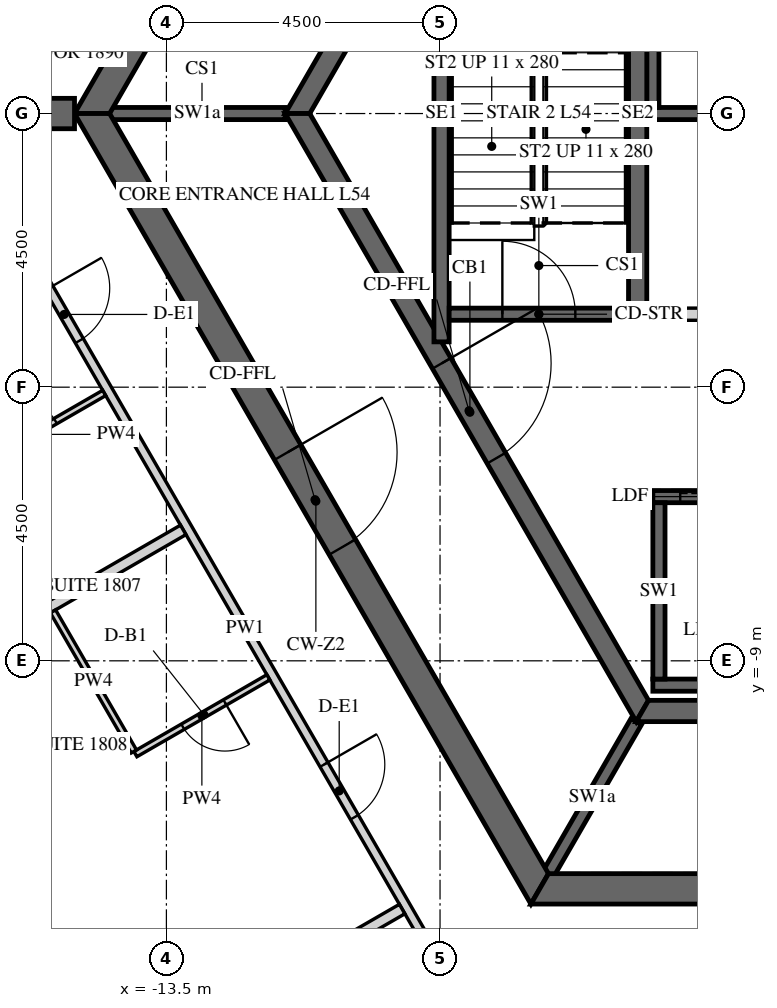
"""IFC4 building model, lengths in metres.
Left out: names, types, materials, properties, quantities, classifications, styles, units other than length and angle.
Written with IfcOpenShell. Run it as: python <this file> out.ifc"""

import sys

from ifc_helpers import new_model, si_unit, direction, frame, frame_2d, origin, place, context, subcontext, project, spatial, polyline, rectangle, outline, extrude, element, fill, save


model = new_model("IFC4")
c1 = context("Model", 3, precision=1e-05, world=origin(), true_north=direction((0.0, 1.0)))
c2 = subcontext(c1, "Body", "Model", "MODEL_VIEW")
j1 = project(units=[si_unit("LENGTHUNIT", "METRE"), si_unit("PLANEANGLEUNIT", "RADIAN")], contexts=[c1])
p1 = place(None, origin())
s1 = spatial("IfcSite", under=j1, at=p1, CompositionType="ELEMENT")
p2 = place(p1, origin())
s2 = spatial("IfcBuilding", under=s1, at=p2, CompositionType="ELEMENT")
p3 = place(p2, frame((0.0, 0.0, 226.8)))
s3 = spatial("IfcBuildingStorey", under=s2, at=p3, CompositionType="ELEMENT", Elevation=226.8)
p4 = place(p3, frame((-7.361, 12.75, -0.15), z_axis=(0.0, 0.0, 1.0), x_axis=(-0.50000571537, -0.866022103989, 0.0)))
e1 = element("IfcWall", 1, at=p4, inside=s3, PredefinedType="SHEAR", context=c2, shape_type="SweptSolid", body=[
    extrude(outline(polyline([(-0.144, -0.25), (14.867, -0.25), (14.578, 0.25), (0.144, 0.25), (-0.144, -0.25)])), origin(), (0.0, 0.0, 1.0), 3.9),
])
p5 = place(p4, frame((6.49, 0.0, 0.15)))
e2 = element("IfcOpeningElement", 2, at=p5, cuts=e1, PredefinedType="OPENING", context=c2, shape_type="SweptSolid", body=[
    extrude(rectangle(XDim=1.8, YDim=2.4, at=frame_2d((0.9, 1.2))), frame((0.0, 0.26, 0.0), z_axis=(0.0, -1.0, 0.0), x_axis=(1.0, 0.0, 0.0)), (0.0, 0.0, 1.0), 0.52),
])
p6 = place(p3, frame((-14.722, 0.0, -0.15), z_axis=(0.0, 0.0, 1.0), x_axis=(0.50000571537, -0.866022103989, 0.0)))
e3 = element("IfcWall", 3, at=p6, inside=s3, PredefinedType="SHEAR", context=c2, shape_type="SweptSolid", body=[
    extrude(outline(polyline([(-0.144, -0.25), (14.867, -0.25), (14.578, 0.25), (0.144, 0.25), (-0.144, -0.25)])), origin(), (0.0, 0.0, 1.0), 3.9),
])
p7 = place(p6, frame((6.432, 0.0, 0.15)))
e4 = element("IfcOpeningElement", 4, at=p7, cuts=e3, PredefinedType="OPENING", context=c2, shape_type="SweptSolid", body=[
    extrude(rectangle(XDim=1.8, YDim=2.4, at=frame_2d((0.9, 1.2))), frame((0.0, 0.26, 0.0), z_axis=(0.0, -1.0, 0.0), x_axis=(1.0, 0.0, 0.0)), (0.0, 0.0, 1.0), 0.52),
])
p8 = place(p3, frame((-7.361, -12.75, -0.15), z_axis=(0.0, 0.0, 1.0), x_axis=(1.0, 0.0, 0.0)))
e5 = element("IfcWall", 5, at=p8, inside=s3, PredefinedType="SHEAR", context=c2, shape_type="SweptSolid", body=[
    extrude(outline(polyline([(-0.144, -0.25), (14.866, -0.25), (14.578, 0.25), (0.144, 0.25), (-0.144, -0.25)])), origin(), (0.0, 0.0, 1.0), 3.9),
])
p9 = place(p8, frame((6.761, 0.0, 0.15)))
e6 = element("IfcOpeningElement", 6, at=p9, cuts=e5, PredefinedType="OPENING", context=c2, shape_type="SweptSolid", body=[
    extrude(rectangle(XDim=1.2, YDim=2.4, at=frame_2d((0.6, 1.2))), frame((0.0, 0.26, 0.0), z_axis=(0.0, -1.0, 0.0), x_axis=(1.0, 0.0, 0.0)), (0.0, 0.0, 1.0), 0.52),
])
p10 = place(p3, frame((-15.011, 0.0, -0.15), z_axis=(0.0, 0.0, 1.0), x_axis=(-1.0, 0.0, 0.0)))
e7 = element("IfcWall", 7, at=p10, inside=s3, PredefinedType="SHEAR", context=c2, shape_type="SweptSolid", body=[
    extrude(rectangle(XDim=15.424, YDim=0.5, at=frame_2d((7.712, 0.0))), origin(), (0.0, 0.0, 1.0), 3.9),
])
p11 = place(p10, frame((6.812, 0.0, 0.15)))
e8 = element("IfcOpeningElement", 8, at=p11, cuts=e7, PredefinedType="OPENING", context=c2, shape_type="SweptSolid", body=[
    extrude(rectangle(XDim=1.8, YDim=2.4, at=frame_2d((0.9, 1.2))), frame((0.0, 0.26, 0.0), z_axis=(0.0, -1.0, 0.0), x_axis=(1.0, 0.0, 0.0)), (0.0, 0.0, 1.0), 0.52),
])
p12 = place(p3, frame((-5.673, 9.825, -0.15), z_axis=(0.0, 0.0, 1.0), x_axis=(-0.499995046907, -0.866028263435, 0.0)))
e9 = element("IfcWall", 9, at=p12, inside=s3, PredefinedType="SHEAR", context=c2, shape_type="SweptSolid", body=[
    extrude(outline(polyline([(-0.101, -0.175), (11.446, -0.175), (11.244, 0.175), (0.101, 0.175), (-0.101, -0.175)])), origin(), (0.0, 0.0, 1.0), 3.9),
])
p13 = place(p12, frame((4.801, 0.0, 0.15)))
e10 = element("IfcOpeningElement", 10, at=p13, cuts=e9, PredefinedType="OPENING", context=c2, shape_type="SweptSolid", body=[
    extrude(rectangle(XDim=1.8, YDim=2.4, at=frame_2d((0.9, 1.2))), frame((0.0, 0.185, 0.0), z_axis=(0.0, -1.0, 0.0), x_axis=(1.0, 0.0, 0.0)), (0.0, 0.0, 1.0), 0.37),
])
p14 = place(p3, frame((-11.345, 0.0, -0.15), z_axis=(0.0, 0.0, 1.0), x_axis=(0.499995046907, -0.866028263435, 0.0)))
e11 = element("IfcWall", 11, at=p14, inside=s3, PredefinedType="SHEAR", context=c2, shape_type="SweptSolid", body=[
    extrude(outline(polyline([(-0.101, -0.175), (11.446, -0.175), (11.244, 0.175), (0.101, 0.175), (-0.101, -0.175)])), origin(), (0.0, 0.0, 1.0), 3.9),
])
p15 = place(p14, frame((4.744, 0.0, 0.15)))
e12 = element("IfcOpeningElement", 12, at=p15, cuts=e11, PredefinedType="OPENING", context=c2, shape_type="SweptSolid", body=[
    extrude(rectangle(XDim=1.8, YDim=2.4, at=frame_2d((0.9, 1.2))), frame((0.0, 0.185, 0.0), z_axis=(0.0, -1.0, 0.0), x_axis=(1.0, 0.0, 0.0)), (0.0, 0.0, 1.0), 0.37),
])
p16 = place(p3, frame((-5.673, -9.825, -0.15), z_axis=(0.0, 0.0, 1.0), x_axis=(1.0, 0.0, 0.0)))
e13 = element("IfcWall", 13, at=p16, inside=s3, PredefinedType="SHEAR", context=c2, shape_type="SweptSolid", body=[
    extrude(outline(polyline([(-0.101, -0.175), (11.446, -0.175), (11.244, 0.175), (0.101, 0.175), (-0.101, -0.175)])), origin(), (0.0, 0.0, 1.0), 3.9),
])
p17 = place(p3, frame((-5.6, 0.0, -0.25), z_axis=(0.0, 0.0, 1.0), x_axis=(1.0, 0.0, 0.0)))
e14 = element("IfcWall", 14, at=p17, inside=s3, PredefinedType="SHEAR", context=c2, shape_type="SweptSolid", body=[
    extrude(rectangle(XDim=11.2, YDim=0.2, at=frame_2d((5.6, 0.0))), origin(), (0.0, 0.0, 1.0), 3.9),
])
p18 = place(p3, frame((-5.5, 0.1, -0.25), z_axis=(0.0, 0.0, 1.0), x_axis=(0.0, 1.0, 0.0)))
e15 = element("IfcWall", 15, at=p18, inside=s3, PredefinedType="SHEAR", context=c2, shape_type="SweptSolid", body=[
    extrude(rectangle(XDim=3.1, YDim=0.2, at=frame_2d((1.55, 0.0))), origin(), (0.0, 0.0, 1.0), 3.9),
])
p19 = place(p3, frame((-5.5, -6.3, -0.25), z_axis=(0.0, 0.0, 1.0), x_axis=(1.0, 0.0, 0.0)))
e16 = element("IfcWall", 16, at=p19, inside=s3, PredefinedType="SHEAR", context=c2, shape_type="SweptSolid", body=[
    extrude(rectangle(XDim=9.2, YDim=0.2, at=frame_2d((4.6, 0.0))), origin(), (0.0, 0.0, 1.0), 3.9),
])
p20 = place(p19, frame((0.45, 0.0, 0.25)))
e17 = element("IfcOpeningElement", 17, at=p20, cuts=e16, PredefinedType="OPENING", context=c2, shape_type="SweptSolid", body=[
    extrude(rectangle(XDim=1.1, YDim=2.1, at=frame_2d((0.55, 1.05))), frame((0.0, 0.11, 0.0), z_axis=(0.0, -1.0, 0.0), x_axis=(1.0, 0.0, 0.0)), (0.0, 0.0, 1.0), 0.22),
])
p21 = place(p19, frame((2.25, 0.0, 0.25)))
e18 = element("IfcOpeningElement", 18, at=p21, cuts=e16, PredefinedType="OPENING", context=c2, shape_type="SweptSolid", body=[
    extrude(rectangle(XDim=1.1, YDim=2.1, at=frame_2d((0.55, 1.05))), frame((0.0, 0.11, 0.0), z_axis=(0.0, -1.0, 0.0), x_axis=(1.0, 0.0, 0.0)), (0.0, 0.0, 1.0), 0.22),
])
p22 = place(p19, frame((4.05, 0.0, 0.25)))
e19 = element("IfcOpeningElement", 19, at=p22, cuts=e16, PredefinedType="OPENING", context=c2, shape_type="SweptSolid", body=[
    extrude(rectangle(XDim=1.1, YDim=2.1, at=frame_2d((0.55, 1.05))), frame((0.0, 0.11, 0.0), z_axis=(0.0, -1.0, 0.0), x_axis=(1.0, 0.0, 0.0)), (0.0, 0.0, 1.0), 0.22),
])
p23 = place(p19, frame((5.85, 0.0, 0.25)))
e20 = element("IfcOpeningElement", 20, at=p23, cuts=e16, PredefinedType="OPENING", context=c2, shape_type="SweptSolid", body=[
    extrude(rectangle(XDim=1.1, YDim=2.1, at=frame_2d((0.55, 1.05))), frame((0.0, 0.11, 0.0), z_axis=(0.0, -1.0, 0.0), x_axis=(1.0, 0.0, 0.0)), (0.0, 0.0, 1.0), 0.22),
])
p24 = place(p19, frame((7.65, 0.0, 0.25)))
e21 = element("IfcOpeningElement", 21, at=p24, cuts=e16, PredefinedType="OPENING", context=c2, shape_type="SweptSolid", body=[
    extrude(rectangle(XDim=1.1, YDim=2.1, at=frame_2d((0.55, 1.05))), frame((0.0, 0.11, 0.0), z_axis=(0.0, -1.0, 0.0), x_axis=(1.0, 0.0, 0.0)), (0.0, 0.0, 1.0), 0.22),
])
p25 = place(p3, frame((-5.5, -9.4, -0.25), z_axis=(0.0, 0.0, 1.0), x_axis=(1.0, 0.0, 0.0)))
e22 = element("IfcWall", 22, at=p25, inside=s3, PredefinedType="SHEAR", context=c2, shape_type="SweptSolid", body=[
    extrude(rectangle(XDim=9.2, YDim=0.2, at=frame_2d((4.6, 0.0))), origin(), (0.0, 0.0, 1.0), 3.9),
])
p26 = place(p3, frame((-5.4, -9.3, -0.25), z_axis=(0.0, 0.0, 1.0), x_axis=(0.0, 1.0, 0.0)))
e23 = element("IfcWall", 23, at=p26, inside=s3, PredefinedType="SHEAR", context=c2, shape_type="SweptSolid", body=[
    extrude(rectangle(XDim=2.9, YDim=0.2, at=frame_2d((1.45, 0.0))), origin(), (0.0, 0.0, 1.0), 3.9),
])
p27 = place(p3, frame((-5.6, -3.3, 0.0), z_axis=(0.0, 0.0, 1.0), x_axis=(1.0, 0.0, 0.0)))
e24 = element("IfcWall", 24, at=p27, inside=s3, PredefinedType="PARTITIONING", context=c2, shape_type="SweptSolid", body=[
    extrude(rectangle(XDim=5.5, YDim=0.2, at=frame_2d((2.75, 0.0))), origin(), (0.0, 0.0, 1.0), 3.65),
])
p28 = place(p27, frame((2.3, 0.0, 0.0)))
e25 = element("IfcOpeningElement", 25, at=p28, cuts=e24, PredefinedType="OPENING", context=c2, shape_type="SweptSolid", body=[
    extrude(rectangle(XDim=0.9, YDim=2.1, at=frame_2d((0.45, 1.05))), frame((0.0, 0.11, 0.0), z_axis=(0.0, -1.0, 0.0), x_axis=(1.0, 0.0, 0.0)), (0.0, 0.0, 1.0), 0.22),
])
for number, where, z_axis, x_axis in (
    (26, (-11.547, 0.0, -0.15), (0.0, 0.0, 1.0), (-1.0, 0.0, 0.0)),
    (27, (-5.773, -10.0, -0.15), (0.0, 0.0, 1.0), (-0.5, -0.866, 0.0)),
):
    element("IfcWall", number, at=place(p3, frame(where, z_axis=z_axis, x_axis=x_axis)), inside=s3, PredefinedType="SHEAR", context=c2, shape_type="SweptSolid", body=[
        extrude(rectangle(XDim=2.887, YDim=0.2, at=frame_2d((1.443, 0.0))), origin(), (0.0, 0.0, 1.0), 3.9),
    ])
p29 = place(p3, frame((-5.75, -3.4, -0.25), z_axis=(0.0, 0.0, 1.0), x_axis=(0.0, 1.0, 0.0)))
e28 = element("IfcWall", 28, at=p29, inside=s3, PredefinedType="SHEAR", context=c2, shape_type="SweptSolid", body=[
    extrude(rectangle(XDim=6.8, YDim=0.3, at=frame_2d((3.4, 0.0))), origin(), (0.0, 0.0, 1.0), 3.9),
])
p30 = place(p3, frame((-8.975, -3.755, -0.25), z_axis=(0.0, 0.0, 1.0), x_axis=(0.0, 1.0, 0.0)))
e29 = element("IfcWall", 29, at=p30, inside=s3, PredefinedType="SHEAR", context=c2, shape_type="SweptSolid", body=[
    extrude(rectangle(XDim=7.51, YDim=0.25, at=frame_2d((3.755, 0.0))), origin(), (0.0, 0.0, 1.0), 3.9),
])
p31 = place(p3, frame((-8.85, -3.3, -0.25), z_axis=(0.0, 0.0, 1.0), x_axis=(1.0, 0.0, 0.0)))
e30 = element("IfcWall", 30, at=p31, inside=s3, PredefinedType="SHEAR", context=c2, shape_type="SweptSolid", body=[
    extrude(rectangle(XDim=2.95, YDim=0.2, at=frame_2d((1.475, 0.0))), origin(), (0.0, 0.0, 1.0), 3.9),
])
p32 = place(p31, frame((0.875, 0.0, 0.25)))
e31 = element("IfcOpeningElement", 31, at=p32, cuts=e30, PredefinedType="OPENING", context=c2, shape_type="SweptSolid", body=[
    extrude(rectangle(XDim=1.2, YDim=2.4, at=frame_2d((0.6, 1.2))), frame((0.0, 0.11, 0.0), z_axis=(0.0, -1.0, 0.0), x_axis=(1.0, 0.0, 0.0)), (0.0, 0.0, 1.0), 0.22),
])
p33 = place(p3, frame((-15.863, -2.125, 0.0), z_axis=(0.0, 0.0, 1.0), x_axis=(0.500008833422, -0.866020303746, 0.0)))
e32 = element("IfcWall", 32, at=p33, inside=s3, PredefinedType="PARTITIONING", context=c2, shape_type="SweptSolid", body=[
    extrude(rectangle(XDim=14.636, YDim=0.15, at=frame_2d((7.318, 0.0))), origin(), (0.0, 0.0, 1.0), 2.988),
])
p34 = place(p33, frame((0.861, 0.0, 0.0)))
e33 = element("IfcOpeningElement", 33, at=p34, cuts=e32, PredefinedType="OPENING", context=c2, shape_type="SweptSolid", body=[
    extrude(rectangle(XDim=1.0, YDim=2.1, at=frame_2d((0.5, 1.05))), frame((0.0, 0.085, 0.0), z_axis=(0.0, -1.0, 0.0), x_axis=(1.0, 0.0, 0.0)), (0.0, 0.0, 1.0), 0.17),
])
p35 = place(p33, frame((9.909, 0.0, 0.0)))
e34 = element("IfcOpeningElement", 34, at=p35, cuts=e32, PredefinedType="OPENING", context=c2, shape_type="SweptSolid", body=[
    extrude(rectangle(XDim=1.0, YDim=2.1, at=frame_2d((0.5, 1.05))), frame((0.0, 0.085, 0.0), z_axis=(0.0, -1.0, 0.0), x_axis=(1.0, 0.0, 0.0)), (0.0, 0.0, 1.0), 0.17),
])
p36 = place(p3, frame((-16.883, -5.958, 0.0), z_axis=(0.0, 0.0, 1.0), x_axis=(0.866012511928, 0.500022328685, 0.0)))
e35 = element("IfcWall", 35, at=p36, inside=s3, PredefinedType="PARTITIONING", context=c2, shape_type="SweptSolid", body=[
    extrude(rectangle(XDim=2.725, YDim=0.1, at=frame_2d((1.363, 0.0))), origin(), (0.0, 0.0, 1.0), 2.988),
])
p37 = place(p36, frame((1.0, 0.0, 0.0)))
e36 = element("IfcOpeningElement", 36, at=p37, cuts=e35, PredefinedType="OPENING", context=c2, shape_type="SweptSolid", body=[
    extrude(rectangle(XDim=0.8, YDim=2.1, at=frame_2d((0.4, 1.05))), frame((0.0, 0.06, 0.0), z_axis=(0.0, -1.0, 0.0), x_axis=(1.0, 0.0, 0.0)), (0.0, 0.0, 1.0), 0.12),
])
p38 = place(p3, frame((-24.114, -13.134, 0.0), z_axis=(0.0, 0.0, 1.0), x_axis=(0.866024255907, 0.500001988177, 0.0)))
e37 = element("IfcWall", 37, at=p38, inside=s3, PredefinedType="PARTITIONING", context=c2, shape_type="SweptSolid", body=[
    extrude(rectangle(XDim=12.575, YDim=0.18, at=frame_2d((6.288, 0.0))), origin(), (0.0, 0.0, 1.0), 2.988),
])
p39 = place(p3, frame((-11.823, -9.272, 0.0), z_axis=(0.0, 0.0, 1.0), x_axis=(-0.866039067339, -0.499976333282, 0.0)))
e38 = element("IfcWall", 38, at=p39, inside=s3, PredefinedType="PARTITIONING", context=c2, shape_type="SweptSolid", body=[
    extrude(rectangle(XDim=2.525, YDim=0.1, at=frame_2d((1.262, 0.0))), origin(), (0.0, 0.0, 1.0), 2.988),
])
p40 = place(p39, frame((0.825, 0.0, 0.0)))
e39 = element("IfcOpeningElement", 39, at=p40, cuts=e38, PredefinedType="OPENING", context=c2, shape_type="SweptSolid", body=[
    extrude(rectangle(XDim=0.8, YDim=2.1, at=frame_2d((0.4, 1.05))), frame((0.0, 0.06, 0.0), z_axis=(0.0, -1.0, 0.0), x_axis=(1.0, 0.0, 0.0)), (0.0, 0.0, 1.0), 0.12),
])
p41 = place(p3, frame((-14.035, -10.491, 0.0), z_axis=(0.0, 0.0, 1.0), x_axis=(-0.50004820116, 0.865997573043, 0.0)))
e40 = element("IfcWall", 40, at=p41, inside=s3, PredefinedType="PARTITIONING", context=c2, shape_type="SweptSolid", body=[
    extrude(rectangle(XDim=2.66, YDim=0.1, at=frame_2d((1.33, 0.0))), origin(), (0.0, 0.0, 1.0), 2.988),
])
p42 = place(p3, frame((-20.513, -19.37, 0.0), z_axis=(0.0, 0.0, 1.0), x_axis=(0.866019402111, 0.500010395058, 0.0)))
e41 = element("IfcWall", 41, at=p42, inside=s3, PredefinedType="PARTITIONING", context=c2, shape_type="SweptSolid", body=[
    extrude(rectangle(XDim=12.575, YDim=0.18, at=frame_2d((6.288, 0.0))), origin(), (0.0, 0.0, 1.0), 2.988),
])
p43 = place(p7, origin())
e42 = element("IfcDoor", 42, at=p43, inside=s3, OperationType="DOUBLE_DOOR_SINGLE_SWING", PredefinedType="DOOR", context=c2, shape_type="SweptSolid", body=[
    extrude(rectangle(XDim=1.8, YDim=2.4, at=frame_2d((0.9, 1.2))), frame((0.0, 0.025, 0.0), z_axis=(0.0, -1.0, 0.0), x_axis=(1.0, 0.0, 0.0)), (0.0, 0.0, 1.0), 0.05),
])
fill(e4, e42)
p44 = place(p15, origin())
e43 = element("IfcDoor", 43, at=p44, inside=s3, OperationType="DOUBLE_DOOR_SINGLE_SWING", PredefinedType="DOOR", context=c2, shape_type="SweptSolid", body=[
    extrude(rectangle(XDim=1.8, YDim=2.4, at=frame_2d((0.9, 1.2))), frame((0.0, 0.025, 0.0), z_axis=(0.0, -1.0, 0.0), x_axis=(1.0, 0.0, 0.0)), (0.0, 0.0, 1.0), 0.05),
])
fill(e12, e43)
p45 = place(p32, origin())
e44 = element("IfcDoor", 44, at=p45, inside=s3, OperationType="SINGLE_SWING_LEFT", PredefinedType="DOOR", context=c2, shape_type="SweptSolid", body=[
    extrude(rectangle(XDim=1.2, YDim=2.4, at=frame_2d((0.6, 1.2))), frame((0.0, 0.025, 0.0), z_axis=(0.0, -1.0, 0.0), x_axis=(1.0, 0.0, 0.0)), (0.0, 0.0, 1.0), 0.05),
])
fill(e31, e44)
p46 = place(p20, origin())
e45 = element("IfcDoor", 45, at=p46, inside=s3, OperationType="SLIDING_TO_LEFT", PredefinedType="DOOR", context=c2, shape_type="SweptSolid", body=[
    extrude(rectangle(XDim=1.1, YDim=2.1, at=frame_2d((0.55, 1.05))), frame((0.0, 0.025, 0.0), z_axis=(0.0, -1.0, 0.0), x_axis=(1.0, 0.0, 0.0)), (0.0, 0.0, 1.0), 0.05),
])
fill(e17, e45)
p47 = place(p34, origin())
e46 = element("IfcDoor", 46, at=p47, inside=s3, OperationType="SINGLE_SWING_RIGHT", PredefinedType="DOOR", context=c2, shape_type="SweptSolid", body=[
    extrude(rectangle(XDim=1.0, YDim=2.1, at=frame_2d((0.5, 1.05))), frame((0.0, 0.025, 0.0), z_axis=(0.0, -1.0, 0.0), x_axis=(1.0, 0.0, 0.0)), (0.0, 0.0, 1.0), 0.05),
])
fill(e33, e46)
p48 = place(p37, origin())
e47 = element("IfcDoor", 47, at=p48, inside=s3, OperationType="SINGLE_SWING_LEFT", PredefinedType="DOOR", context=c2, shape_type="SweptSolid", body=[
    extrude(rectangle(XDim=0.8, YDim=2.1, at=frame_2d((0.4, 1.05))), frame((0.0, 0.025, 0.0), z_axis=(0.0, -1.0, 0.0), x_axis=(1.0, 0.0, 0.0)), (0.0, 0.0, 1.0), 0.05),
])
fill(e36, e47)
p49 = place(p35, origin())
e48 = element("IfcDoor", 48, at=p49, inside=s3, OperationType="SINGLE_SWING_RIGHT", PredefinedType="DOOR", context=c2, shape_type="SweptSolid", body=[
    extrude(rectangle(XDim=1.0, YDim=2.1, at=frame_2d((0.5, 1.05))), frame((0.0, 0.025, 0.0), z_axis=(0.0, -1.0, 0.0), x_axis=(1.0, 0.0, 0.0)), (0.0, 0.0, 1.0), 0.05),
])
fill(e34, e48)
p50 = place(p40, origin())
e49 = element("IfcDoor", 49, at=p50, inside=s3, OperationType="SINGLE_SWING_RIGHT", PredefinedType="DOOR", context=c2, shape_type="SweptSolid", body=[
    extrude(rectangle(XDim=0.8, YDim=2.1, at=frame_2d((0.4, 1.05))), frame((0.0, 0.025, 0.0), z_axis=(0.0, -1.0, 0.0), x_axis=(1.0, 0.0, 0.0)), (0.0, 0.0, 1.0), 0.05),
])
fill(e39, e49)
save(model, sys.argv[1])
